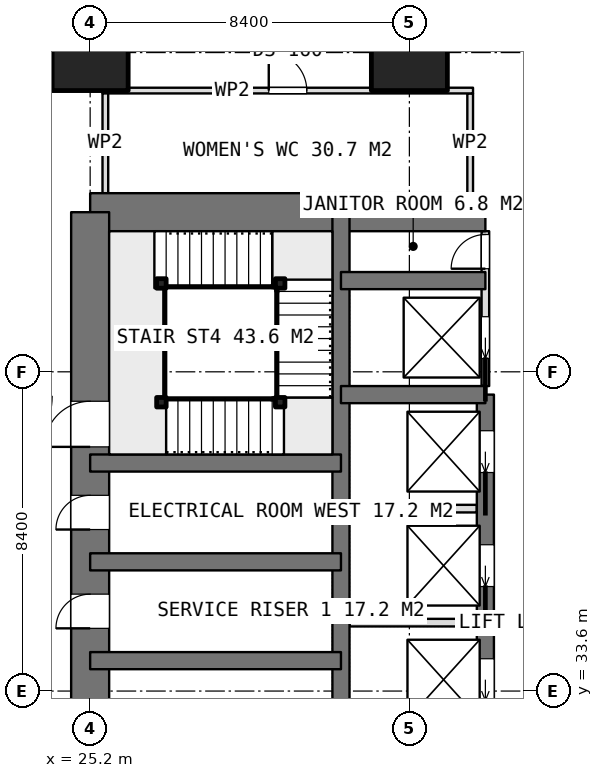
"""IFC4 building model, lengths in metres.
Left out: names, types, materials, properties, quantities, classifications, styles, units other than length and angle.
Written with IfcOpenShell. Run it as: python <this file> out.ifc"""

import sys

from ifc_helpers import new_model, si_unit, direction, frame, frame_2d, origin, origin_2d, place, context, subcontext, project, spatial, rectangle, extrude, element, fill, save


model = new_model("IFC4")
c1 = context("Model", 3, precision=1e-05, world=origin(), true_north=direction((0.0, 1.0)))
c2 = subcontext(c1, "Body", "Model", "MODEL_VIEW")
j1 = project(units=[si_unit("LENGTHUNIT", "METRE"), si_unit("PLANEANGLEUNIT", "RADIAN")], contexts=[c1])
p1 = place(None, origin())
s1 = spatial("IfcSite", under=j1, at=p1, CompositionType="ELEMENT")
p2 = place(p1, origin())
s2 = spatial("IfcBuilding", under=s1, at=p2, CompositionType="ELEMENT")
p3 = place(p2, frame((0.0, 0.0, 147.8)))
s3 = spatial("IfcBuildingStorey", under=s2, at=p3, CompositionType="ELEMENT", Elevation=147.8)
p4 = place(p3, frame((25.2, 46.2, 0.0), z_axis=(0.0, 0.0, 1.0), x_axis=(1.0, 0.0, 0.0)))
e1 = element("IfcWall", 1, at=p4, inside=s3, PredefinedType="SHEAR", context=c2, shape_type="SweptSolid", body=[
    extrude(rectangle(XDim=10.4, YDim=1.0, at=frame_2d((5.2, 0.0))), origin(), (0.0, 0.0, 1.0), 3.75),
])
p5 = place(p3, frame((25.2, 21.0, 0.0), z_axis=(0.0, 0.0, 1.0), x_axis=(0.0, 1.0, 0.0)))
e2 = element("IfcWall", 2, at=p5, inside=s3, PredefinedType="SHEAR", context=c2, shape_type="SweptSolid", body=[
    extrude(rectangle(XDim=25.2, YDim=1.0, at=frame_2d((12.6, 0.0))), origin(), (0.0, 0.0, 1.0), 3.75),
])
p6 = place(p5, frame((7.8, 0.0, 0.0)))
e3 = element("IfcOpeningElement", 3, at=p6, cuts=e2, PredefinedType="OPENING", context=c2, shape_type="SweptSolid", body=[
    extrude(rectangle(XDim=1.2, YDim=2.1, at=frame_2d((0.6, 1.05))), frame((0.0, 0.51, 0.0), z_axis=(0.0, -1.0, 0.0), x_axis=(1.0, 0.0, 0.0)), (0.0, 0.0, 1.0), 1.02),
])
p7 = place(p5, frame((14.25, 0.0, 0.0)))
e4 = element("IfcOpeningElement", 4, at=p7, cuts=e2, PredefinedType="OPENING", context=c2, shape_type="SweptSolid", body=[
    extrude(rectangle(XDim=0.9, YDim=2.1, at=frame_2d((0.45, 1.05))), frame((0.0, 0.51, 0.0), z_axis=(0.0, -1.0, 0.0), x_axis=(1.0, 0.0, 0.0)), (0.0, 0.0, 1.0), 1.02),
])
p8 = place(p5, frame((16.85, 0.0, 0.0)))
e5 = element("IfcOpeningElement", 5, at=p8, cuts=e2, PredefinedType="OPENING", context=c2, shape_type="SweptSolid", body=[
    extrude(rectangle(XDim=0.9, YDim=2.1, at=frame_2d((0.45, 1.05))), frame((0.0, 0.51, 0.0), z_axis=(0.0, -1.0, 0.0), x_axis=(1.0, 0.0, 0.0)), (0.0, 0.0, 1.0), 1.02),
])
p9 = place(p5, frame((19.025, 0.0, 0.0)))
e6 = element("IfcOpeningElement", 6, at=p9, cuts=e2, PredefinedType="OPENING", context=c2, shape_type="SweptSolid", body=[
    extrude(rectangle(XDim=1.2, YDim=2.1, at=frame_2d((0.6, 1.05))), frame((0.0, 0.51, 0.0), z_axis=(0.0, -1.0, 0.0), x_axis=(1.0, 0.0, 0.0)), (0.0, 0.0, 1.0), 1.02),
])
p10 = place(p3, frame((31.8, 21.0, 0.0), z_axis=(0.0, 0.0, 1.0), x_axis=(0.0, 1.0, 0.0)))
e7 = element("IfcWall", 7, at=p10, inside=s3, PredefinedType="SHEAR", context=c2, shape_type="SweptSolid", body=[
    extrude(rectangle(XDim=25.2, YDim=0.45, at=frame_2d((12.6, 0.0))), origin(), (0.0, 0.0, 1.0), 3.75),
])
p11 = place(p3, frame((35.6, 23.4, 0.0), z_axis=(0.0, 0.0, 1.0), x_axis=(0.0, 1.0, 0.0)))
e8 = element("IfcWall", 8, at=p11, inside=s3, PredefinedType="SHEAR", context=c2, shape_type="SweptSolid", body=[
    extrude(rectangle(XDim=18.0, YDim=0.45, at=frame_2d((9.0, 0.0))), origin(), (0.0, 0.0, 1.0), 3.75),
])
p12 = place(p11, frame((0.95, 0.0, 0.0)))
e9 = element("IfcOpeningElement", 9, at=p12, cuts=e8, PredefinedType="OPENING", context=c2, shape_type="SweptSolid", body=[
    extrude(rectangle(XDim=1.1, YDim=2.1, at=frame_2d((0.55, 1.05))), frame((0.0, 0.235, 0.0), z_axis=(0.0, -1.0, 0.0), x_axis=(1.0, 0.0, 0.0)), (0.0, 0.0, 1.0), 0.47),
])
p13 = place(p11, frame((3.95, 0.0, 0.0)))
e10 = element("IfcOpeningElement", 10, at=p13, cuts=e8, PredefinedType="OPENING", context=c2, shape_type="SweptSolid", body=[
    extrude(rectangle(XDim=1.1, YDim=2.1, at=frame_2d((0.55, 1.05))), frame((0.0, 0.235, 0.0), z_axis=(0.0, -1.0, 0.0), x_axis=(1.0, 0.0, 0.0)), (0.0, 0.0, 1.0), 0.47),
])
p14 = place(p11, frame((6.95, 0.0, 0.0)))
e11 = element("IfcOpeningElement", 11, at=p14, cuts=e8, PredefinedType="OPENING", context=c2, shape_type="SweptSolid", body=[
    extrude(rectangle(XDim=1.1, YDim=2.1, at=frame_2d((0.55, 1.05))), frame((0.0, 0.235, 0.0), z_axis=(0.0, -1.0, 0.0), x_axis=(1.0, 0.0, 0.0)), (0.0, 0.0, 1.0), 0.47),
])
p15 = place(p11, frame((9.95, 0.0, 0.0)))
e12 = element("IfcOpeningElement", 12, at=p15, cuts=e8, PredefinedType="OPENING", context=c2, shape_type="SweptSolid", body=[
    extrude(rectangle(XDim=1.1, YDim=2.1, at=frame_2d((0.55, 1.05))), frame((0.0, 0.235, 0.0), z_axis=(0.0, -1.0, 0.0), x_axis=(1.0, 0.0, 0.0)), (0.0, 0.0, 1.0), 0.47),
])
p16 = place(p11, frame((12.95, 0.0, 0.0)))
e13 = element("IfcOpeningElement", 13, at=p16, cuts=e8, PredefinedType="OPENING", context=c2, shape_type="SweptSolid", body=[
    extrude(rectangle(XDim=1.1, YDim=2.1, at=frame_2d((0.55, 1.05))), frame((0.0, 0.235, 0.0), z_axis=(0.0, -1.0, 0.0), x_axis=(1.0, 0.0, 0.0)), (0.0, 0.0, 1.0), 0.47),
])
p17 = place(p11, frame((15.95, 0.0, 0.0)))
e14 = element("IfcOpeningElement", 14, at=p17, cuts=e8, PredefinedType="OPENING", context=c2, shape_type="SweptSolid", body=[
    extrude(rectangle(XDim=1.1, YDim=2.1, at=frame_2d((0.55, 1.05))), frame((0.0, 0.235, 0.0), z_axis=(0.0, -1.0, 0.0), x_axis=(1.0, 0.0, 0.0)), (0.0, 0.0, 1.0), 0.47),
])
for number, where, z_axis, x_axis in (
    (15, (31.8, 41.4, 0.0), (0.0, 0.0, 1.0), (1.0, 0.0, 0.0)),
    (16, (31.8, 44.4, 0.0), (0.0, 0.0, 1.0), (1.0, 0.0, 0.0)),
):
    element("IfcWall", number, at=place(p3, frame(where, z_axis=z_axis, x_axis=x_axis)), inside=s3, PredefinedType="SHEAR", context=c2, shape_type="SweptSolid", body=[
        extrude(rectangle(XDim=3.8, YDim=0.45, at=frame_2d((1.9, 0.0))), origin(), (0.0, 0.0, 1.0), 3.75),
    ])
for number, where, z_axis, x_axis in (
    (17, (25.2, 34.4, 0.0), (0.0, 0.0, 1.0), (1.0, 0.0, 0.0)),
    (18, (25.2, 37.0, 0.0), (0.0, 0.0, 1.0), (1.0, 0.0, 0.0)),
    (19, (25.2, 39.6, 0.0), (0.0, 0.0, 1.0), (1.0, 0.0, 0.0)),
):
    element("IfcWall", number, at=place(p3, frame(where, z_axis=z_axis, x_axis=x_axis)), inside=s3, PredefinedType="SHEAR", context=c2, shape_type="SweptSolid", body=[
        extrude(rectangle(XDim=6.6, YDim=0.45, at=frame_2d((3.3, 0.0))), origin(), (0.0, 0.0, 1.0), 3.75),
    ])
for number, where, z_axis, x_axis in (
    (20, (25.2, 50.4, 0.0), (0.0, 0.0, 1.0), (1.0, 0.0, 0.0)),
    (21, (33.6, 50.4, 0.0), (0.0, 0.0, 1.0), (1.0, 0.0, 0.0)),
):
    element("IfcColumn", number, at=place(p3, frame(where, z_axis=z_axis, x_axis=x_axis)), inside=s3, PredefinedType="COLUMN", context=c2, shape_type="SweptSolid", body=[
        extrude(rectangle(XDim=2.0, YDim=2.0, at=origin_2d()), origin(), (0.0, 0.0, 1.0), 3.75),
    ])
for number, where, z_axis, x_axis in (
    (22, (32.025, 35.4, 0.0), (0.0, 0.0, 1.0), (1.0, 0.0, 0.0)),
    (23, (32.025, 38.4, 0.0), (0.0, 0.0, 1.0), (1.0, 0.0, 0.0)),
):
    element("IfcWall", number, at=place(p3, frame(where, z_axis=z_axis, x_axis=x_axis)), inside=s3, PredefinedType="PARTITIONING", context=c2, shape_type="SweptSolid", body=[
        extrude(rectangle(XDim=3.35, YDim=0.2, at=frame_2d((1.675, 0.0))), origin(), (0.0, 0.0, 1.0), 3.5),
    ])
p18 = place(p3, frame((35.6, 41.625, 0.0), z_axis=(0.0, 0.0, 1.0), x_axis=(0.0, 1.0, 0.0)))
e24 = element("IfcWall", 24, at=p18, inside=s3, PredefinedType="PARTITIONING", context=c2, shape_type="SweptSolid", body=[
    extrude(rectangle(XDim=4.075, YDim=0.2, at=frame_2d((2.038, 0.0))), origin(), (0.0, 0.0, 1.0), 3.5),
])
p19 = place(p18, frame((3.088, 0.0, 0.0)))
e25 = element("IfcOpeningElement", 25, at=p19, cuts=e24, PredefinedType="OPENING", context=c2, shape_type="SweptSolid", body=[
    extrude(rectangle(XDim=0.9, YDim=2.1, at=frame_2d((0.45, 1.05))), frame((0.0, 0.11, 0.0), z_axis=(0.0, -1.0, 0.0), x_axis=(1.0, 0.0, 0.0)), (0.0, 0.0, 1.0), 0.22),
])
p20 = place(p18, frame((0.725, 0.0, 0.0)))
e26 = element("IfcOpeningElement", 26, at=p20, cuts=e24, PredefinedType="OPENING", context=c2, shape_type="SweptSolid", body=[
    extrude(rectangle(XDim=1.1, YDim=2.1, at=frame_2d((0.55, 1.05))), frame((0.0, 0.11, 0.0), z_axis=(0.0, -1.0, 0.0), x_axis=(1.0, 0.0, 0.0)), (0.0, 0.0, 1.0), 0.22),
])
p21 = place(p3, frame((25.525, 49.4, 0.0), z_axis=(0.0, 0.0, 1.0), x_axis=(1.0, 0.0, 0.0)))
e27 = element("IfcWall", 27, at=p21, inside=s3, PredefinedType="PARTITIONING", context=c2, shape_type="SweptSolid", body=[
    extrude(rectangle(XDim=9.75, YDim=0.15, at=frame_2d((4.875, 0.0))), origin(), (0.0, 0.0, 1.0), 3.5),
])
p22 = place(p21, frame((4.375, 0.0, 0.0)))
e28 = element("IfcOpeningElement", 28, at=p22, cuts=e27, PredefinedType="OPENING", context=c2, shape_type="SweptSolid", body=[
    extrude(rectangle(XDim=1.0, YDim=2.1, at=frame_2d((0.5, 1.05))), frame((0.0, 0.085, 0.0), z_axis=(0.0, -1.0, 0.0), x_axis=(1.0, 0.0, 0.0)), (0.0, 0.0, 1.0), 0.17),
])
for number, where, z_axis, x_axis in (
    (29, (25.6, 46.7, 0.0), (0.0, 0.0, 1.0), (0.0, 1.0, 0.0)),
    (30, (35.2, 46.7, 0.0), (0.0, 0.0, 1.0), (0.0, 1.0, 0.0)),
):
    element("IfcWall", number, at=place(p3, frame(where, z_axis=z_axis, x_axis=x_axis)), inside=s3, PredefinedType="PARTITIONING", context=c2, shape_type="SweptSolid", body=[
        extrude(rectangle(XDim=2.625, YDim=0.15, at=frame_2d((1.312, 0.0))), origin(), (0.0, 0.0, 1.0), 3.5),
    ])
for number, where, z_axis, x_axis in (
    (31, (27.075, 41.2, 0.0), (0.0, 0.0, 1.0), (1.0, 0.0, 0.0)),
    (32, (30.2, 41.2, 0.0), (0.0, 0.0, 1.0), (1.0, 0.0, 0.0)),
    (33, (30.2, 44.325, 0.0), (0.0, 0.0, 1.0), (1.0, 0.0, 0.0)),
    (34, (27.075, 44.325, 0.0), (0.0, 0.0, 1.0), (1.0, 0.0, 0.0)),
):
    element("IfcColumn", number, at=place(p3, frame(where, z_axis=z_axis, x_axis=x_axis)), inside=s3, PredefinedType="COLUMN", context=c2, shape_type="SweptSolid", body=[
        extrude(rectangle(XDim=0.25, YDim=0.25, at=origin_2d()), origin(), (0.0, 0.0, 1.0), 3.75),
    ])
p23 = place(p7, origin())
e35 = element("IfcDoor", 35, at=p23, inside=s3, OperationType="SINGLE_SWING_LEFT", PredefinedType="DOOR", context=c2, shape_type="SweptSolid", body=[
    extrude(rectangle(XDim=0.9, YDim=2.1, at=frame_2d((0.45, 1.05))), frame((0.0, 0.025, 0.0), z_axis=(0.0, -1.0, 0.0), x_axis=(1.0, 0.0, 0.0)), (0.0, 0.0, 1.0), 0.05),
])
fill(e4, e35)
p24 = place(p8, origin())
e36 = element("IfcDoor", 36, at=p24, inside=s3, OperationType="SINGLE_SWING_LEFT", PredefinedType="DOOR", context=c2, shape_type="SweptSolid", body=[
    extrude(rectangle(XDim=0.9, YDim=2.1, at=frame_2d((0.45, 1.05))), frame((0.0, 0.025, 0.0), z_axis=(0.0, -1.0, 0.0), x_axis=(1.0, 0.0, 0.0)), (0.0, 0.0, 1.0), 0.05),
])
fill(e5, e36)
p25 = place(p19, origin())
e37 = element("IfcDoor", 37, at=p25, inside=s3, OperationType="SINGLE_SWING_LEFT", PredefinedType="DOOR", context=c2, shape_type="SweptSolid", body=[
    extrude(rectangle(XDim=0.9, YDim=2.1, at=frame_2d((0.45, 1.05))), frame((0.0, 0.025, 0.0), z_axis=(0.0, -1.0, 0.0), x_axis=(1.0, 0.0, 0.0)), (0.0, 0.0, 1.0), 0.05),
])
fill(e25, e37)
p26 = place(p15, origin())
e38 = element("IfcDoor", 38, at=p26, inside=s3, OperationType="SLIDING_TO_LEFT", PredefinedType="USERDEFINED", context=c2, shape_type="SweptSolid", body=[
    extrude(rectangle(XDim=1.1, YDim=2.1, at=frame_2d((0.55, 1.05))), frame((0.0, 0.025, 0.0), z_axis=(0.0, -1.0, 0.0), x_axis=(1.0, 0.0, 0.0)), (0.0, 0.0, 1.0), 0.05),
])
fill(e12, e38)
p27 = place(p16, origin())
e39 = element("IfcDoor", 39, at=p27, inside=s3, OperationType="SLIDING_TO_LEFT", PredefinedType="USERDEFINED", context=c2, shape_type="SweptSolid", body=[
    extrude(rectangle(XDim=1.1, YDim=2.1, at=frame_2d((0.55, 1.05))), frame((0.0, 0.025, 0.0), z_axis=(0.0, -1.0, 0.0), x_axis=(1.0, 0.0, 0.0)), (0.0, 0.0, 1.0), 0.05),
])
fill(e13, e39)
p28 = place(p17, origin())
e40 = element("IfcDoor", 40, at=p28, inside=s3, OperationType="SLIDING_TO_LEFT", PredefinedType="USERDEFINED", context=c2, shape_type="SweptSolid", body=[
    extrude(rectangle(XDim=1.1, YDim=2.1, at=frame_2d((0.55, 1.05))), frame((0.0, 0.025, 0.0), z_axis=(0.0, -1.0, 0.0), x_axis=(1.0, 0.0, 0.0)), (0.0, 0.0, 1.0), 0.05),
])
fill(e14, e40)
p29 = place(p20, origin())
e41 = element("IfcDoor", 41, at=p29, inside=s3, OperationType="SLIDING_TO_LEFT", PredefinedType="USERDEFINED", context=c2, shape_type="SweptSolid", body=[
    extrude(rectangle(XDim=1.1, YDim=2.1, at=frame_2d((0.55, 1.05))), frame((0.0, 0.025, 0.0), z_axis=(0.0, -1.0, 0.0), x_axis=(1.0, 0.0, 0.0)), (0.0, 0.0, 1.0), 0.05),
])
fill(e26, e41)
p30 = place(p22, origin())
e42 = element("IfcDoor", 42, at=p30, inside=s3, OperationType="SINGLE_SWING_LEFT", PredefinedType="DOOR", context=c2, shape_type="SweptSolid", body=[
    extrude(rectangle(XDim=1.0, YDim=2.1, at=frame_2d((0.5, 1.05))), frame((0.0, 0.025, 0.0), z_axis=(0.0, -1.0, 0.0), x_axis=(1.0, 0.0, 0.0)), (0.0, 0.0, 1.0), 0.05),
])
fill(e28, e42)
p31 = place(p9, origin())
e43 = element("IfcDoor", 43, at=p31, inside=s3, OperationType="SINGLE_SWING_RIGHT", PredefinedType="DOOR", context=c2, shape_type="SweptSolid", body=[
    extrude(rectangle(XDim=1.2, YDim=2.1, at=frame_2d((0.6, 1.05))), frame((0.0, 0.025, 0.0), z_axis=(0.0, -1.0, 0.0), x_axis=(1.0, 0.0, 0.0)), (0.0, 0.0, 1.0), 0.05),
])
fill(e6, e43)
save(model, sys.argv[1])
